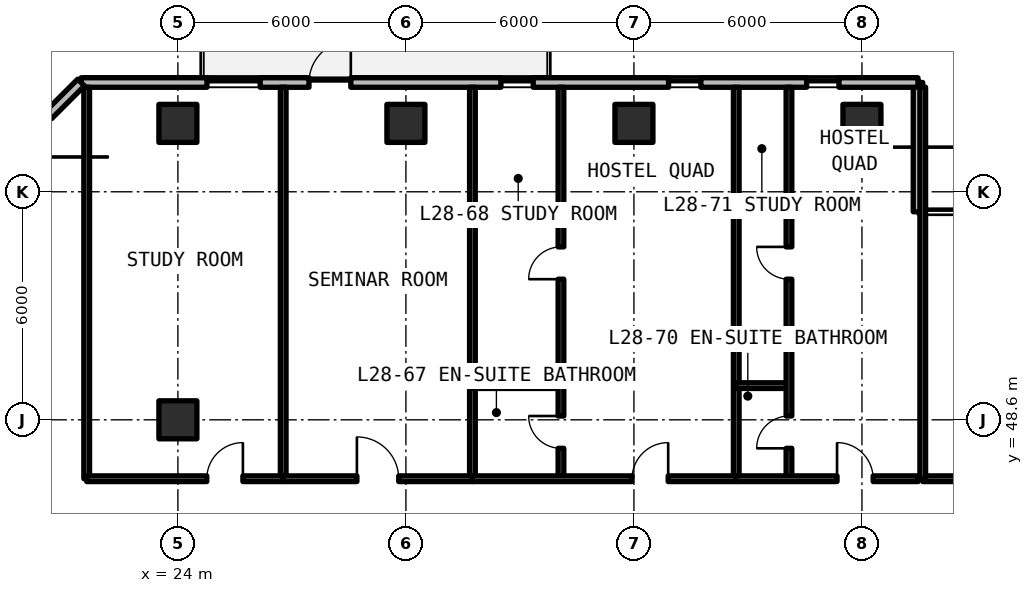
"""IFC4 building model, lengths in metres.
Left out: names, types, materials, properties, quantities, classifications, styles, units other than length and angle.
Written with IfcOpenShell. Run it as: python <this file> out.ifc"""

import sys

from ifc_helpers import new_model, si_unit, direction, frame, frame_2d, origin, origin_2d, place, context, subcontext, project, spatial, rectangle, extrude, element, fill, save


model = new_model("IFC4")
c1 = context("Model", 3, precision=1e-05, world=origin(), true_north=direction((0.0, 1.0)))
c2 = subcontext(c1, "Body", "Model", "MODEL_VIEW")
j1 = project(units=[si_unit("LENGTHUNIT", "METRE"), si_unit("PLANEANGLEUNIT", "RADIAN")], contexts=[c1])
p1 = place(None, origin())
s1 = spatial("IfcSite", under=j1, at=p1, CompositionType="ELEMENT")
p2 = place(p1, origin())
s2 = spatial("IfcBuilding", under=s1, at=p2, CompositionType="ELEMENT")
p3 = place(p2, frame((0.0, 0.0, 101.97)))
s3 = spatial("IfcBuildingStorey", under=s2, at=p3, CompositionType="ELEMENT", Elevation=101.97)
for number, where, z_axis, x_axis in (
    (1, (24.0, 48.6, 0.0), (0.0, 0.0, 1.0), (1.0, 0.0, 0.0)),
    (2, (24.0, 56.4, 0.0), (0.0, 0.0, 1.0), (1.0, 0.0, 0.0)),
    (3, (30.0, 56.4, 0.0), (0.0, 0.0, 1.0), (1.0, 0.0, 0.0)),
    (4, (36.0, 56.4, 0.0), (0.0, 0.0, 1.0), (1.0, 0.0, 0.0)),
    (5, (42.0, 56.4, 0.0), (0.0, 0.0, 1.0), (1.0, 0.0, 0.0)),
):
    element("IfcColumn", number, at=place(p3, frame(where, z_axis=z_axis, x_axis=x_axis)), inside=s3, PredefinedType="COLUMN", context=c2, shape_type="SweptSolid", body=[
        extrude(rectangle(XDim=1.0, YDim=1.0, at=origin_2d()), origin(), (0.0, 0.0, 1.0), 3.3),
    ])
p4 = place(p3, frame((43.475, 54.075, 0.0), z_axis=(0.0, 0.0, 1.0), x_axis=(0.0, 1.0, 0.0)))
e6 = element("IfcWall", 6, at=p4, inside=s3, PredefinedType="SOLIDWALL", context=c2, shape_type="SweptSolid", body=[
    extrude(rectangle(XDim=3.4, YDim=0.25, at=frame_2d((1.7, 0.0))), origin(), (0.0, 0.0, 1.0), 3.08),
])
p5 = place(p3, frame((43.475, 57.475, 0.0), z_axis=(0.0, 0.0, 1.0), x_axis=(-1.0, 0.0, 0.0)))
e7 = element("IfcWall", 7, at=p5, inside=s3, PredefinedType="SOLIDWALL", context=c2, shape_type="SweptSolid", body=[
    extrude(rectangle(XDim=22.023, YDim=0.25, at=frame_2d((11.012, 0.0))), origin(), (0.0, 0.0, 1.0), 3.08),
])
p6 = place(p5, frame((14.925, 0.0, 0.0)))
e8 = element("IfcOpeningElement", 8, at=p6, cuts=e7, PredefinedType="OPENING", context=c2, shape_type="SweptSolid", body=[
    extrude(rectangle(XDim=1.1, YDim=2.15, at=frame_2d((0.55, 1.075))), frame((0.0, 0.135, 0.0), z_axis=(0.0, -1.0, 0.0), x_axis=(1.0, 0.0, 0.0)), (0.0, 0.0, 1.0), 0.27),
])
p7 = place(p5, frame((17.31, 0.0, 0.78)))
e9 = element("IfcOpeningElement", 9, at=p7, cuts=e7, PredefinedType="OPENING", context=c2, shape_type="SweptSolid", body=[
    extrude(rectangle(XDim=1.4, YDim=1.65, at=frame_2d((0.7, 0.825))), frame((0.0, 0.135, 0.0), z_axis=(0.0, -1.0, 0.0), x_axis=(1.0, 0.0, 0.0)), (0.0, 0.0, 1.0), 0.27),
])
p8 = place(p5, frame((10.125, 0.0, 0.78)))
e10 = element("IfcOpeningElement", 10, at=p8, cuts=e7, PredefinedType="OPENING", context=c2, shape_type="SweptSolid", body=[
    extrude(rectangle(XDim=0.85, YDim=1.65, at=frame_2d((0.425, 0.825))), frame((0.0, 0.135, 0.0), z_axis=(0.0, -1.0, 0.0), x_axis=(1.0, 0.0, 0.0)), (0.0, 0.0, 1.0), 0.27),
])
p9 = place(p5, frame((5.714, 0.0, 0.78)))
e11 = element("IfcOpeningElement", 11, at=p9, cuts=e7, PredefinedType="OPENING", context=c2, shape_type="SweptSolid", body=[
    extrude(rectangle(XDim=0.85, YDim=1.65, at=frame_2d((0.425, 0.825))), frame((0.0, 0.135, 0.0), z_axis=(0.0, -1.0, 0.0), x_axis=(1.0, 0.0, 0.0)), (0.0, 0.0, 1.0), 0.27),
])
p10 = place(p5, frame((2.08, 0.0, 0.78)))
e12 = element("IfcOpeningElement", 12, at=p10, cuts=e7, PredefinedType="OPENING", context=c2, shape_type="SweptSolid", body=[
    extrude(rectangle(XDim=0.85, YDim=1.65, at=frame_2d((0.425, 0.825))), frame((0.0, 0.135, 0.0), z_axis=(0.0, -1.0, 0.0), x_axis=(1.0, 0.0, 0.0)), (0.0, 0.0, 1.0), 0.27),
])
p11 = place(p3, frame((21.452, 57.475, 0.0), z_axis=(0.0, 0.0, 1.0), x_axis=(-0.707106781187, -0.707106781187, 0.0)))
e13 = element("IfcWall", 13, at=p11, inside=s3, PredefinedType="SOLIDWALL", context=c2, shape_type="SweptSolid", body=[
    extrude(rectangle(XDim=5.836, YDim=0.25, at=frame_2d((2.918, 0.0))), origin(), (0.0, 0.0, 1.0), 3.08),
])
p12 = place(p11, frame((1.218, 0.0, 0.78)))
e14 = element("IfcOpeningElement", 14, at=p12, cuts=e13, PredefinedType="OPENING", context=c2, shape_type="SweptSolid", body=[
    extrude(rectangle(XDim=3.4, YDim=1.66, at=frame_2d((1.7, 0.83))), frame((0.0, 0.135, 0.0), z_axis=(0.0, -1.0, 0.0), x_axis=(1.0, 0.0, 0.0)), (0.0, 0.0, 1.0), 0.27),
])
p13 = place(p3, frame((43.6, 47.05, 0.0), z_axis=(0.0, 0.0, 1.0), x_axis=(1.0, 0.0, 0.0)))
e15 = element("IfcWall", 15, at=p13, inside=s3, PredefinedType="SOLIDWALL", context=c2, shape_type="SweptSolid", body=[
    extrude(rectangle(XDim=8.4, YDim=0.15, at=frame_2d((4.2, 0.0))), origin(), (0.0, 0.0, 1.0), 2.35),
])
p14 = place(p13, frame((3.65, 0.0, 0.0)))
e16 = element("IfcOpeningElement", 16, at=p14, cuts=e15, PredefinedType="OPENING", context=c2, shape_type="SweptSolid", body=[
    extrude(rectangle(XDim=1.1, YDim=2.15, at=frame_2d((0.55, 1.075))), frame((0.0, 0.085, 0.0), z_axis=(0.0, -1.0, 0.0), x_axis=(1.0, 0.0, 0.0)), (0.0, 0.0, 1.0), 0.17),
])
for number, where, z_axis, x_axis in (
    (17, (43.6, 47.05, 0.0), (0.0, 0.0, 1.0), (0.0, 1.0, 0.0)),
    (18, (21.6, 47.05, 0.0), (0.0, 0.0, 1.0), (0.0, 1.0, 0.0)),
    (19, (26.771, 47.05, 0.0), (0.0, 0.0, 1.0), (0.0, 1.0, 0.0)),
):
    element("IfcWall", number, at=place(p3, frame(where, z_axis=z_axis, x_axis=x_axis)), inside=s3, PredefinedType="SOLIDWALL", context=c2, shape_type="SweptSolid", body=[
        extrude(rectangle(XDim=10.3, YDim=0.15, at=frame_2d((5.15, 0.0))), origin(), (0.0, 0.0, 1.0), 2.35),
    ])
p15 = place(p3, frame((21.6, 47.05, 0.0), z_axis=(0.0, 0.0, 1.0), x_axis=(1.0, 0.0, 0.0)))
e20 = element("IfcWall", 20, at=p15, inside=s3, PredefinedType="SOLIDWALL", context=c2, shape_type="SweptSolid", body=[
    extrude(rectangle(XDim=5.171, YDim=0.15, at=frame_2d((2.585, 0.0))), origin(), (0.0, 0.0, 1.0), 2.35),
])
p16 = place(p15, frame((3.16, 0.0, 0.0)))
e21 = element("IfcOpeningElement", 21, at=p16, cuts=e20, PredefinedType="OPENING", context=c2, shape_type="SweptSolid", body=[
    extrude(rectangle(XDim=0.95, YDim=2.15, at=frame_2d((0.475, 1.075))), frame((0.0, 0.085, 0.0), z_axis=(0.0, -1.0, 0.0), x_axis=(1.0, 0.0, 0.0)), (0.0, 0.0, 1.0), 0.17),
])
p17 = place(p3, frame((31.75, 47.05, 0.0), z_axis=(0.0, 0.0, 1.0), x_axis=(0.0, 1.0, 0.0)))
e22 = element("IfcWall", 22, at=p17, inside=s3, PredefinedType="SOLIDWALL", context=c2, shape_type="SweptSolid", body=[
    extrude(rectangle(XDim=10.3, YDim=0.15, at=frame_2d((5.15, 0.0))), origin(), (0.0, 0.0, 1.0), 2.35),
])
p18 = place(p3, frame((26.771, 47.05, 0.0), z_axis=(0.0, 0.0, 1.0), x_axis=(1.0, 0.0, 0.0)))
e23 = element("IfcWall", 23, at=p18, inside=s3, PredefinedType="SOLIDWALL", context=c2, shape_type="SweptSolid", body=[
    extrude(rectangle(XDim=4.979, YDim=0.15, at=frame_2d((2.49, 0.0))), origin(), (0.0, 0.0, 1.0), 2.35),
])
p19 = place(p18, frame((1.94, 0.0, 0.0)))
e24 = element("IfcOpeningElement", 24, at=p19, cuts=e23, PredefinedType="OPENING", context=c2, shape_type="SweptSolid", body=[
    extrude(rectangle(XDim=1.1, YDim=2.15, at=frame_2d((0.55, 1.075))), frame((0.0, 0.085, 0.0), z_axis=(0.0, -1.0, 0.0), x_axis=(1.0, 0.0, 0.0)), (0.0, 0.0, 1.0), 0.17),
])
p20 = place(p3, frame((38.692, 47.05, 0.0), z_axis=(0.0, 0.0, 1.0), x_axis=(0.0, 1.0, 0.0)))
e25 = element("IfcWall", 25, at=p20, inside=s3, PredefinedType="SOLIDWALL", context=c2, shape_type="SweptSolid", body=[
    extrude(rectangle(XDim=10.3, YDim=0.15, at=frame_2d((5.15, 0.0))), origin(), (0.0, 0.0, 1.0), 2.35),
])
p21 = place(p3, frame((31.75, 49.5, 0.0), z_axis=(0.0, 0.0, 1.0), x_axis=(1.0, 0.0, 0.0)))
e26 = element("IfcWall", 26, at=p21, inside=s3, PredefinedType="PARTITIONING", context=c2, shape_type="SweptSolid", body=[
    extrude(rectangle(XDim=2.33, YDim=0.15, at=frame_2d((1.165, 0.0))), origin(), (0.0, 0.0, 1.0), 2.35),
])
p22 = place(p3, frame((34.08, 47.05, 0.0), z_axis=(0.0, 0.0, 1.0), x_axis=(0.0, 1.0, 0.0)))
e27 = element("IfcWall", 27, at=p22, inside=s3, PredefinedType="PARTITIONING", context=c2, shape_type="SweptSolid", body=[
    extrude(rectangle(XDim=10.3, YDim=0.15, at=frame_2d((5.15, 0.0))), origin(), (0.0, 0.0, 1.0), 2.35),
])
p23 = place(p22, frame((0.8, 0.0, 0.0)))
e28 = element("IfcOpeningElement", 28, at=p23, cuts=e27, PredefinedType="OPENING", context=c2, shape_type="SweptSolid", body=[
    extrude(rectangle(XDim=0.85, YDim=2.1, at=frame_2d((0.425, 1.05))), frame((0.0, 0.085, 0.0), z_axis=(0.0, -1.0, 0.0), x_axis=(1.0, 0.0, 0.0)), (0.0, 0.0, 1.0), 0.17),
])
p24 = place(p22, frame((5.25, 0.0, 0.0)))
e29 = element("IfcOpeningElement", 29, at=p24, cuts=e27, PredefinedType="OPENING", context=c2, shape_type="SweptSolid", body=[
    extrude(rectangle(XDim=0.85, YDim=2.1, at=frame_2d((0.425, 1.05))), frame((0.0, 0.085, 0.0), z_axis=(0.0, -1.0, 0.0), x_axis=(1.0, 0.0, 0.0)), (0.0, 0.0, 1.0), 0.17),
])
p25 = place(p3, frame((31.75, 47.05, 0.0), z_axis=(0.0, 0.0, 1.0), x_axis=(1.0, 0.0, 0.0)))
e30 = element("IfcWall", 30, at=p25, inside=s3, PredefinedType="SOLIDWALL", context=c2, shape_type="SweptSolid", body=[
    extrude(rectangle(XDim=6.942, YDim=0.15, at=frame_2d((3.471, 0.0))), origin(), (0.0, 0.0, 1.0), 2.35),
])
p26 = place(p25, frame((4.201, 0.0, 0.0)))
e31 = element("IfcOpeningElement", 31, at=p26, cuts=e30, PredefinedType="OPENING", context=c2, shape_type="SweptSolid", body=[
    extrude(rectangle(XDim=0.95, YDim=2.15, at=frame_2d((0.475, 1.075))), frame((0.0, 0.085, 0.0), z_axis=(0.0, -1.0, 0.0), x_axis=(1.0, 0.0, 0.0)), (0.0, 0.0, 1.0), 0.17),
])
p27 = place(p3, frame((38.692, 49.5, 0.0), z_axis=(0.0, 0.0, 1.0), x_axis=(1.0, 0.0, 0.0)))
e32 = element("IfcWall", 32, at=p27, inside=s3, PredefinedType="PARTITIONING", context=c2, shape_type="SweptSolid", body=[
    extrude(rectangle(XDim=1.388, YDim=0.15, at=frame_2d((0.694, 0.0))), origin(), (0.0, 0.0, 1.0), 2.35),
])
p28 = place(p3, frame((40.08, 47.05, 0.0), z_axis=(0.0, 0.0, 1.0), x_axis=(0.0, 1.0, 0.0)))
e33 = element("IfcWall", 33, at=p28, inside=s3, PredefinedType="PARTITIONING", context=c2, shape_type="SweptSolid", body=[
    extrude(rectangle(XDim=10.3, YDim=0.15, at=frame_2d((5.15, 0.0))), origin(), (0.0, 0.0, 1.0), 2.35),
])
p29 = place(p28, frame((0.8, 0.0, 0.0)))
e34 = element("IfcOpeningElement", 34, at=p29, cuts=e33, PredefinedType="OPENING", context=c2, shape_type="SweptSolid", body=[
    extrude(rectangle(XDim=0.85, YDim=2.1, at=frame_2d((0.425, 1.05))), frame((0.0, 0.085, 0.0), z_axis=(0.0, -1.0, 0.0), x_axis=(1.0, 0.0, 0.0)), (0.0, 0.0, 1.0), 0.17),
])
p30 = place(p28, frame((5.25, 0.0, 0.0)))
e35 = element("IfcOpeningElement", 35, at=p30, cuts=e33, PredefinedType="OPENING", context=c2, shape_type="SweptSolid", body=[
    extrude(rectangle(XDim=0.85, YDim=2.1, at=frame_2d((0.425, 1.05))), frame((0.0, 0.085, 0.0), z_axis=(0.0, -1.0, 0.0), x_axis=(1.0, 0.0, 0.0)), (0.0, 0.0, 1.0), 0.17),
])
p31 = place(p3, frame((38.692, 47.05, 0.0), z_axis=(0.0, 0.0, 1.0), x_axis=(1.0, 0.0, 0.0)))
e36 = element("IfcWall", 36, at=p31, inside=s3, PredefinedType="SOLIDWALL", context=c2, shape_type="SweptSolid", body=[
    extrude(rectangle(XDim=4.788, YDim=0.15, at=frame_2d((2.394, 0.0))), origin(), (0.0, 0.0, 1.0), 2.35),
])
p32 = place(p31, frame((2.653, 0.0, 0.0)))
e37 = element("IfcOpeningElement", 37, at=p32, cuts=e36, PredefinedType="OPENING", context=c2, shape_type="SweptSolid", body=[
    extrude(rectangle(XDim=0.95, YDim=2.15, at=frame_2d((0.475, 1.075))), frame((0.0, 0.085, 0.0), z_axis=(0.0, -1.0, 0.0), x_axis=(1.0, 0.0, 0.0)), (0.0, 0.0, 1.0), 0.17),
])
p33 = place(p6, frame((1.1, 0.0, 0.0), z_axis=(0.0, 0.0, 1.0), x_axis=(-1.0, 0.0, 0.0)))
e38 = element("IfcDoor", 38, at=p33, inside=s3, OperationType="SINGLE_SWING_LEFT", PredefinedType="DOOR", context=c2, shape_type="SweptSolid", body=[
    extrude(rectangle(XDim=1.1, YDim=2.15, at=frame_2d((0.55, 1.075))), frame((0.0, 0.025, 0.0), z_axis=(0.0, -1.0, 0.0), x_axis=(1.0, 0.0, 0.0)), (0.0, 0.0, 1.0), 0.05),
])
fill(e8, e38)
p34 = place(p7, origin())
e39 = element("IfcWindow", 39, at=p34, inside=s3, PartitioningType="SINGLE_PANEL", PredefinedType="WINDOW", context=c2, shape_type="SweptSolid", body=[
    extrude(rectangle(XDim=1.4, YDim=1.65, at=frame_2d((0.7, 0.825))), frame((0.0, 0.03, 0.0), z_axis=(0.0, -1.0, 0.0), x_axis=(1.0, 0.0, 0.0)), (0.0, 0.0, 1.0), 0.06),
])
fill(e9, e39)
p35 = place(p8, origin())
e40 = element("IfcWindow", 40, at=p35, inside=s3, PartitioningType="SINGLE_PANEL", PredefinedType="WINDOW", context=c2, shape_type="SweptSolid", body=[
    extrude(rectangle(XDim=0.85, YDim=1.65, at=frame_2d((0.425, 0.825))), frame((0.0, 0.03, 0.0), z_axis=(0.0, -1.0, 0.0), x_axis=(1.0, 0.0, 0.0)), (0.0, 0.0, 1.0), 0.06),
])
fill(e10, e40)
p36 = place(p9, origin())
e41 = element("IfcWindow", 41, at=p36, inside=s3, PartitioningType="SINGLE_PANEL", PredefinedType="WINDOW", context=c2, shape_type="SweptSolid", body=[
    extrude(rectangle(XDim=0.85, YDim=1.65, at=frame_2d((0.425, 0.825))), frame((0.0, 0.03, 0.0), z_axis=(0.0, -1.0, 0.0), x_axis=(1.0, 0.0, 0.0)), (0.0, 0.0, 1.0), 0.06),
])
fill(e11, e41)
p37 = place(p10, origin())
e42 = element("IfcWindow", 42, at=p37, inside=s3, PartitioningType="SINGLE_PANEL", PredefinedType="WINDOW", context=c2, shape_type="SweptSolid", body=[
    extrude(rectangle(XDim=0.85, YDim=1.65, at=frame_2d((0.425, 0.825))), frame((0.0, 0.03, 0.0), z_axis=(0.0, -1.0, 0.0), x_axis=(1.0, 0.0, 0.0)), (0.0, 0.0, 1.0), 0.06),
])
fill(e12, e42)
p38 = place(p16, origin())
e43 = element("IfcDoor", 43, at=p38, inside=s3, OperationType="SINGLE_SWING_RIGHT", PredefinedType="DOOR", context=c2, shape_type="SweptSolid", body=[
    extrude(rectangle(XDim=0.95, YDim=2.15, at=frame_2d((0.475, 1.075))), frame((0.0, 0.025, 0.0), z_axis=(0.0, -1.0, 0.0), x_axis=(1.0, 0.0, 0.0)), (0.0, 0.0, 1.0), 0.05),
])
fill(e21, e43)
p39 = place(p19, origin())
e44 = element("IfcDoor", 44, at=p39, inside=s3, OperationType="SINGLE_SWING_LEFT", PredefinedType="DOOR", context=c2, shape_type="SweptSolid", body=[
    extrude(rectangle(XDim=1.1, YDim=2.15, at=frame_2d((0.55, 1.075))), frame((0.0, 0.025, 0.0), z_axis=(0.0, -1.0, 0.0), x_axis=(1.0, 0.0, 0.0)), (0.0, 0.0, 1.0), 0.05),
])
fill(e24, e44)
p40 = place(p23, origin())
e45 = element("IfcDoor", 45, at=p40, inside=s3, OperationType="SINGLE_SWING_RIGHT", PredefinedType="DOOR", context=c2, shape_type="SweptSolid", body=[
    extrude(rectangle(XDim=0.85, YDim=2.1, at=frame_2d((0.425, 1.05))), frame((0.0, 0.025, 0.0), z_axis=(0.0, -1.0, 0.0), x_axis=(1.0, 0.0, 0.0)), (0.0, 0.0, 1.0), 0.05),
])
fill(e28, e45)
p41 = place(p24, origin())
e46 = element("IfcDoor", 46, at=p41, inside=s3, OperationType="SINGLE_SWING_LEFT", PredefinedType="DOOR", context=c2, shape_type="SweptSolid", body=[
    extrude(rectangle(XDim=0.85, YDim=2.1, at=frame_2d((0.425, 1.05))), frame((0.0, 0.025, 0.0), z_axis=(0.0, -1.0, 0.0), x_axis=(1.0, 0.0, 0.0)), (0.0, 0.0, 1.0), 0.05),
])
fill(e29, e46)
p42 = place(p26, origin())
e47 = element("IfcDoor", 47, at=p42, inside=s3, OperationType="SINGLE_SWING_RIGHT", PredefinedType="DOOR", context=c2, shape_type="SweptSolid", body=[
    extrude(rectangle(XDim=0.95, YDim=2.15, at=frame_2d((0.475, 1.075))), frame((0.0, 0.025, 0.0), z_axis=(0.0, -1.0, 0.0), x_axis=(1.0, 0.0, 0.0)), (0.0, 0.0, 1.0), 0.05),
])
fill(e31, e47)
p43 = place(p29, origin())
e48 = element("IfcDoor", 48, at=p43, inside=s3, OperationType="SINGLE_SWING_LEFT", PredefinedType="DOOR", context=c2, shape_type="SweptSolid", body=[
    extrude(rectangle(XDim=0.85, YDim=2.1, at=frame_2d((0.425, 1.05))), frame((0.0, 0.025, 0.0), z_axis=(0.0, -1.0, 0.0), x_axis=(1.0, 0.0, 0.0)), (0.0, 0.0, 1.0), 0.05),
])
fill(e34, e48)
p44 = place(p30, origin())
e49 = element("IfcDoor", 49, at=p44, inside=s3, OperationType="SINGLE_SWING_RIGHT", PredefinedType="DOOR", context=c2, shape_type="SweptSolid", body=[
    extrude(rectangle(XDim=0.85, YDim=2.1, at=frame_2d((0.425, 1.05))), frame((0.0, 0.025, 0.0), z_axis=(0.0, -1.0, 0.0), x_axis=(1.0, 0.0, 0.0)), (0.0, 0.0, 1.0), 0.05),
])
fill(e35, e49)
p45 = place(p32, origin())
e50 = element("IfcDoor", 50, at=p45, inside=s3, OperationType="SINGLE_SWING_LEFT", PredefinedType="DOOR", context=c2, shape_type="SweptSolid", body=[
    extrude(rectangle(XDim=0.95, YDim=2.15, at=frame_2d((0.475, 1.075))), frame((0.0, 0.025, 0.0), z_axis=(0.0, -1.0, 0.0), x_axis=(1.0, 0.0, 0.0)), (0.0, 0.0, 1.0), 0.05),
])
fill(e37, e50)
save(model, sys.argv[1])
